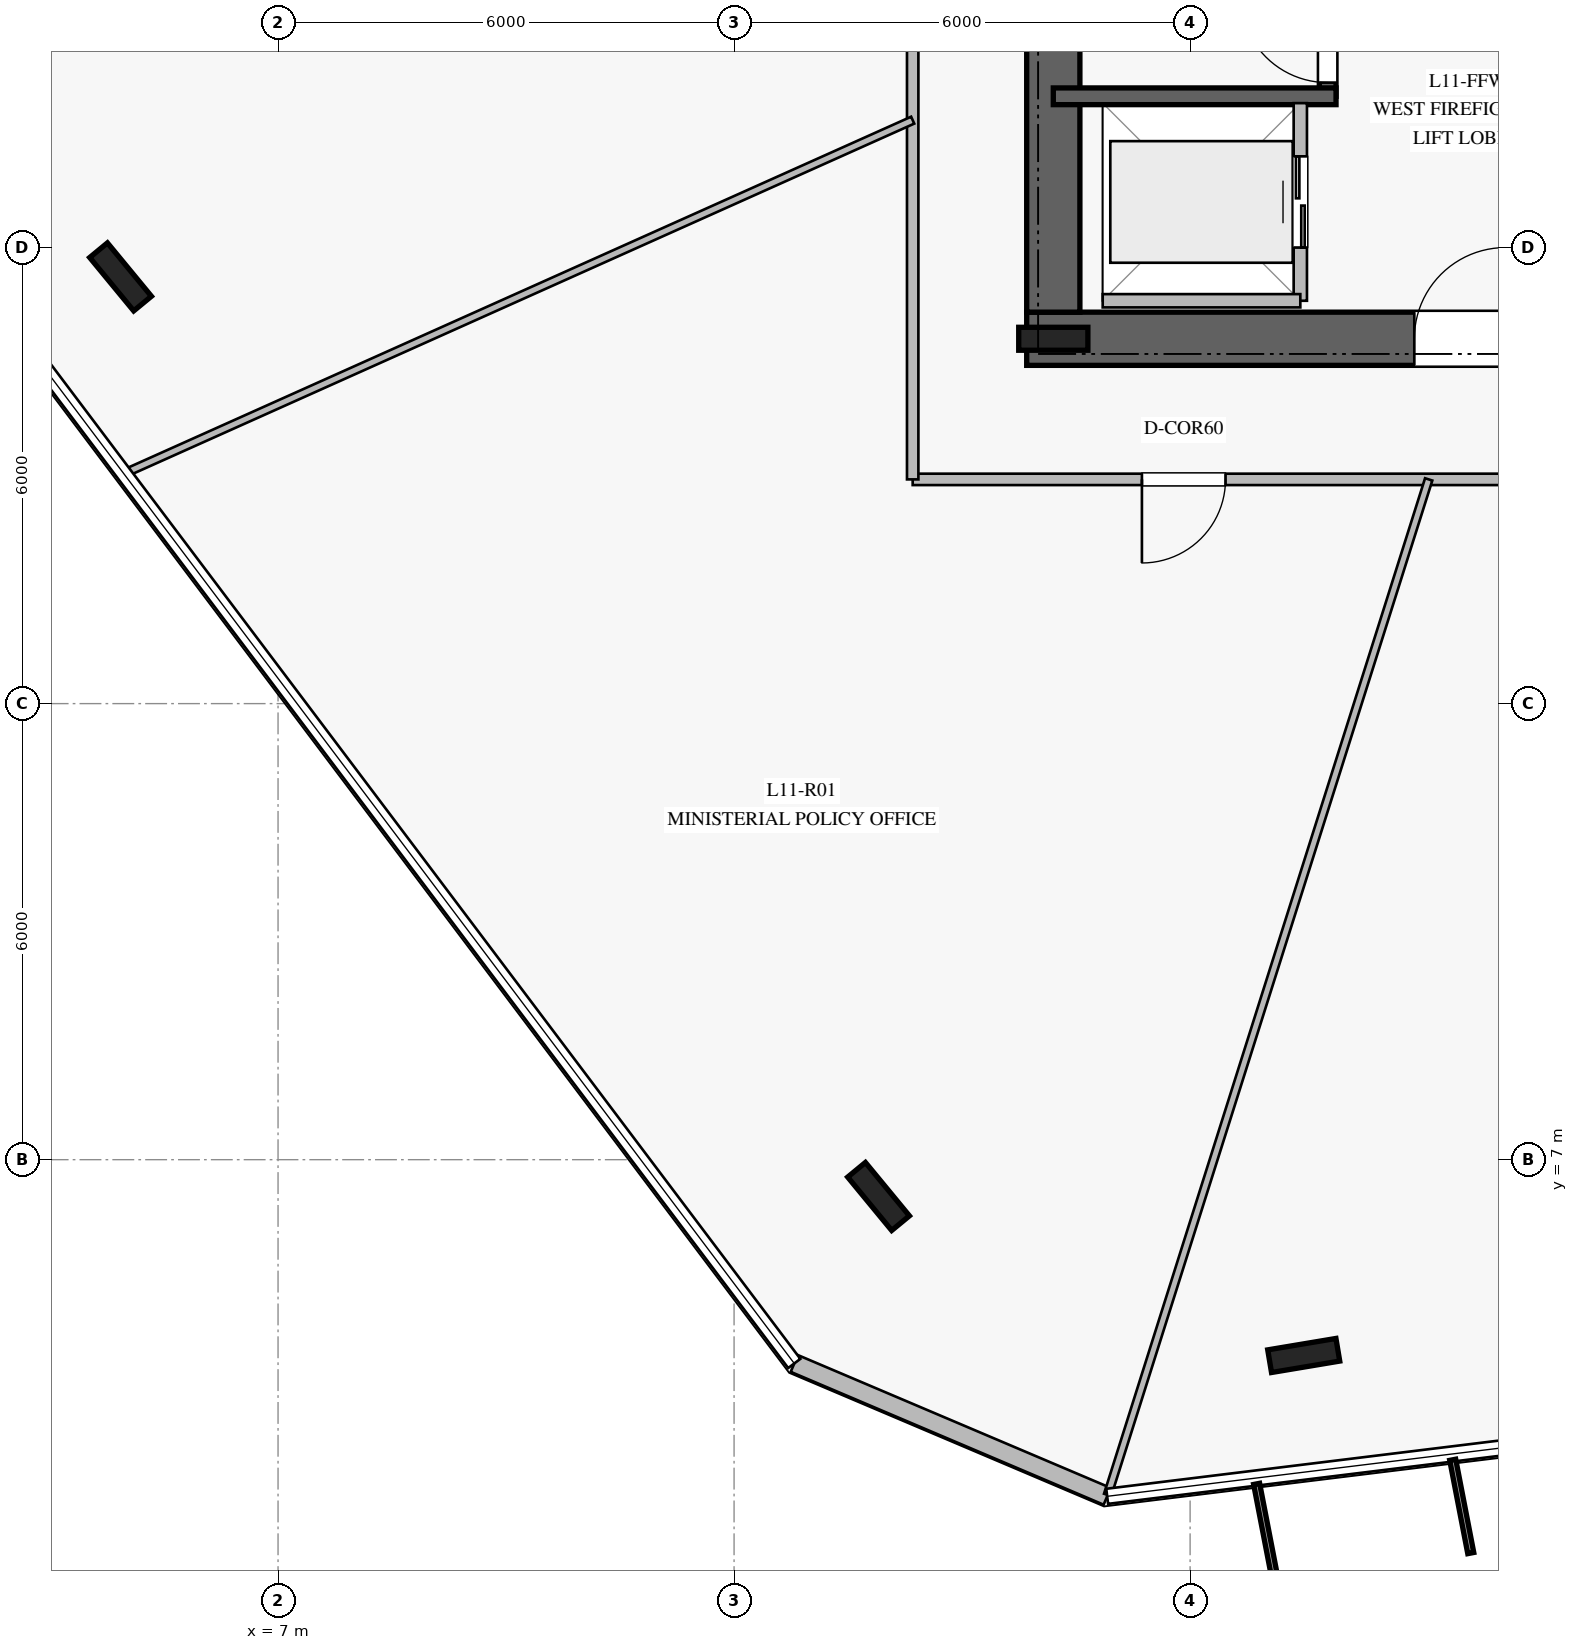
"""IFC4 building model, lengths in metres.
Left out: names, types, materials, properties, quantities, classifications, styles, units other than length and angle.
Written with IfcOpenShell. Run it as: python <this file> out.ifc"""

import sys

from ifc_helpers import new_model, si_unit, direction, frame, frame_2d, origin, origin_2d, place, context, subcontext, project, spatial, rectangle, i_section, extrude, element, fill, save


model = new_model("IFC4")
c1 = context("Model", 3, precision=1e-05, world=origin(), true_north=direction((0.0, 1.0)))
c2 = subcontext(c1, "Body", "Model", "MODEL_VIEW")
j1 = project(units=[si_unit("LENGTHUNIT", "METRE"), si_unit("PLANEANGLEUNIT", "RADIAN")], contexts=[c1])
p1 = place(None, origin())
s1 = spatial("IfcSite", under=j1, at=p1, CompositionType="ELEMENT")
p2 = place(p1, origin())
s2 = spatial("IfcBuilding", under=s1, at=p2, CompositionType="ELEMENT")
p3 = place(p2, frame((0.0, 0.0, 48.0)))
s3 = spatial("IfcBuildingStorey", under=s2, at=p3, CompositionType="ELEMENT", Elevation=48.0)
p4 = place(p3, frame((16.85, 17.8, 0.0), z_axis=(0.0, 0.0, 1.0), x_axis=(1.0, 0.0, 0.0)))
e1 = element("IfcWall", 1, at=p4, inside=s3, PredefinedType="SHEAR", context=c2, shape_type="SweptSolid", body=[
    extrude(rectangle(XDim=16.3, YDim=0.7, at=frame_2d((8.15, 0.0))), origin(), (0.0, 0.0, 1.0), 3.76),
])
p5 = place(p4, frame((5.1, 0.0, 0.0)))
e2 = element("IfcOpeningElement", 2, at=p5, cuts=e1, PredefinedType="OPENING", context=c2, shape_type="SweptSolid", body=[
    extrude(rectangle(XDim=1.2, YDim=2.25, at=frame_2d((0.6, 1.125))), frame((0.0, 0.36, 0.0), z_axis=(0.0, -1.0, 0.0), x_axis=(1.0, 0.0, 0.0)), (0.0, 0.0, 1.0), 0.72),
])
p6 = place(p4, frame((14.05, 0.0, 0.0)))
e3 = element("IfcOpeningElement", 3, at=p6, cuts=e1, PredefinedType="OPENING", context=c2, shape_type="SweptSolid", body=[
    extrude(rectangle(XDim=0.9, YDim=2.1, at=frame_2d((0.45, 1.05))), frame((0.0, 0.36, 0.0), z_axis=(0.0, -1.0, 0.0), x_axis=(1.0, 0.0, 0.0)), (0.0, 0.0, 1.0), 0.72),
])
p7 = place(p4, frame((7.95, 0.0, 0.0)))
e4 = element("IfcOpeningElement", 4, at=p7, cuts=e1, PredefinedType="OPENING", context=c2, shape_type="SweptSolid", body=[
    extrude(rectangle(XDim=1.1, YDim=2.2, at=frame_2d((0.55, 1.1))), frame((0.0, 0.36, 0.0), z_axis=(0.0, -1.0, 0.0), x_axis=(1.0, 0.0, 0.0)), (0.0, 0.0, 1.0), 0.72),
])
p8 = place(p4, frame((9.925, 0.0, 0.0)))
e5 = element("IfcOpeningElement", 5, at=p8, cuts=e1, PredefinedType="OPENING", context=c2, shape_type="SweptSolid", body=[
    extrude(rectangle(XDim=1.1, YDim=2.2, at=frame_2d((0.55, 1.1))), frame((0.0, 0.36, 0.0), z_axis=(0.0, -1.0, 0.0), x_axis=(1.0, 0.0, 0.0)), (0.0, 0.0, 1.0), 0.72),
])
p9 = place(p4, frame((11.9, 0.0, 0.0)))
e6 = element("IfcOpeningElement", 6, at=p9, cuts=e1, PredefinedType="OPENING", context=c2, shape_type="SweptSolid", body=[
    extrude(rectangle(XDim=1.1, YDim=2.2, at=frame_2d((0.55, 1.1))), frame((0.0, 0.36, 0.0), z_axis=(0.0, -1.0, 0.0), x_axis=(1.0, 0.0, 0.0)), (0.0, 0.0, 1.0), 0.72),
])
p10 = place(p3, frame((17.2, 31.85, 0.0), z_axis=(0.0, 0.0, 1.0), x_axis=(0.0, -1.0, 0.0)))
e7 = element("IfcWall", 7, at=p10, inside=s3, PredefinedType="SHEAR", context=c2, shape_type="SweptSolid", body=[
    extrude(rectangle(XDim=13.7, YDim=0.7, at=frame_2d((6.85, 0.0))), origin(), (0.0, 0.0, 1.0), 3.76),
])
p11 = place(p10, frame((2.0, 0.0, 0.0)))
e8 = element("IfcOpeningElement", 8, at=p11, cuts=e7, PredefinedType="OPENING", context=c2, shape_type="SweptSolid", body=[
    extrude(rectangle(XDim=1.5, YDim=2.2, at=frame_2d((0.75, 1.1))), frame((0.0, 0.36, 0.0), z_axis=(0.0, -1.0, 0.0), x_axis=(1.0, 0.0, 0.0)), (0.0, 0.0, 1.0), 0.72),
])
p12 = place(p3, frame((17.2, 17.8, 0.0), z_axis=(0.0, 0.0, 1.0), x_axis=(1.0, 0.0, 0.0)))
e9 = element("IfcColumn", 9, at=p12, inside=s3, PredefinedType="COLUMN", context=c2, shape_type="SweptSolid", body=[
    extrude(i_section(OverallWidth=0.302, OverallDepth=0.91, WebThickness=0.021, FlangeThickness=0.04, at=origin_2d()), origin(), (0.0, 0.0, 1.0), 4.0),
])
p13 = place(p3, frame((20.81, 20.99, 0.0), z_axis=(0.0, 0.0, 1.0), x_axis=(0.0, 1.0, 0.0)))
e10 = element("IfcWall", 10, at=p13, inside=s3, PredefinedType="SOLIDWALL", context=c2, shape_type="SweptSolid", body=[
    extrude(rectangle(XDim=7.22, YDim=0.22, at=frame_2d((3.61, 0.0))), origin(), (0.0, 0.0, 1.0), 3.76),
])
p14 = place(p13, frame((0.18, 0.0, 0.0)))
e11 = element("IfcOpeningElement", 11, at=p14, cuts=e10, PredefinedType="OPENING", context=c2, shape_type="SweptSolid", body=[
    extrude(rectangle(XDim=1.15, YDim=2.2, at=frame_2d((0.575, 1.1))), frame((0.0, 0.12, 0.0), z_axis=(0.0, -1.0, 0.0), x_axis=(1.0, 0.0, 0.0)), (0.0, 0.0, 1.0), 0.24),
])
p15 = place(p3, frame((17.2, 20.99, 0.0), z_axis=(0.0, 0.0, 1.0), x_axis=(1.0, 0.0, 0.0)))
e12 = element("IfcWall", 12, at=p15, inside=s3, PredefinedType="SOLIDWALL", context=c2, shape_type="SweptSolid", body=[
    extrude(rectangle(XDim=3.72, YDim=0.22, at=frame_2d((1.86, 0.0))), origin(), (0.0, 0.0, 1.0), 3.76),
])
for number, where, z_axis, x_axis in (
    (13, (4.928, 18.614, 0.0), (0.0, 0.0, 1.0), (-0.636, 0.772, 0.0)),
    (14, (14.901, 6.516, 0.0), (0.0, 0.0, 1.0), (-0.636, 0.772, 0.0)),
    (15, (20.495, 4.424, 0.0), (0.0, 0.0, 1.0), (0.986, 0.165, 0.0)),
):
    element("IfcColumn", number, at=place(p3, frame(where, z_axis=z_axis, x_axis=x_axis)), inside=s3, PredefinedType="COLUMN", context=c2, shape_type="SweptSolid", body=[
        extrude(i_section(OverallWidth=0.302, OverallDepth=0.91, WebThickness=0.021, FlangeThickness=0.04, at=origin_2d()), origin(), (0.0, 0.0, 1.0), 4.0),
    ])
p16 = place(p3, frame((13.792, 4.319, 0.0), z_axis=(0.0, 0.0, 1.0), x_axis=(0.920463989724, -0.390827383409, 0.0)))
e16 = element("IfcWall", 16, at=p16, inside=s3, PredefinedType="STANDARD", context=c2, shape_type="SweptSolid", body=[
    extrude(rectangle(XDim=4.473, YDim=0.24, at=frame_2d((2.236, 0.0))), origin(), (0.0, 0.0, 1.0), 3.76),
])
p17 = place(p3, frame((20.45, 18.3, 0.0), z_axis=(0.0, 0.0, 1.0), x_axis=(0.0, 1.0, 0.0)))
e17 = element("IfcWall", 17, at=p17, inside=s3, PredefinedType="PARTITIONING", context=c2, shape_type="SweptSolid", body=[
    extrude(rectangle(XDim=2.6, YDim=0.175, at=frame_2d((1.3, 0.0))), origin(), (0.0, 0.0, 1.0), 3.76),
])
p18 = place(p17, frame((0.7, 0.0, 0.0)))
e18 = element("IfcOpeningElement", 18, at=p18, cuts=e17, PredefinedType="OPENING", context=c2, shape_type="SweptSolid", body=[
    extrude(rectangle(XDim=1.2, YDim=2.2, at=frame_2d((0.6, 1.1))), frame((0.0, 0.098, 0.0), z_axis=(0.0, -1.0, 0.0), x_axis=(1.0, 0.0, 0.0)), (0.0, 0.0, 1.0), 0.195),
])
p19 = place(p3, frame((17.85, 18.3, 0.0), z_axis=(0.0, 0.0, 1.0), x_axis=(1.0, 0.0, 0.0)))
e19 = element("IfcWall", 19, at=p19, inside=s3, PredefinedType="PARTITIONING", context=c2, shape_type="SweptSolid", body=[
    extrude(rectangle(XDim=2.6, YDim=0.175, at=frame_2d((1.3, 0.0))), origin(), (0.0, 0.0, 1.0), 3.76),
])
p20 = place(p3, frame((34.65, 15.95, 0.0), z_axis=(0.0, 0.0, 1.0), x_axis=(-1.0, 0.0, 0.0)))
e20 = element("IfcWall", 20, at=p20, inside=s3, PredefinedType="PARTITIONING", context=c2, shape_type="SweptSolid", body=[
    extrude(rectangle(XDim=19.3, YDim=0.15, at=frame_2d((9.65, 0.0))), origin(), (0.0, 0.0, 1.0), 3.21),
])
p21 = place(p20, frame((15.184, 0.0, 0.0)))
e21 = element("IfcOpeningElement", 21, at=p21, cuts=e20, PredefinedType="OPENING", context=c2, shape_type="SweptSolid", body=[
    extrude(rectangle(XDim=1.1, YDim=2.2, at=frame_2d((0.55, 1.1))), frame((0.0, 0.085, 0.0), z_axis=(0.0, -1.0, 0.0), x_axis=(1.0, 0.0, 0.0)), (0.0, 0.0, 1.0), 0.17),
])
p22 = place(p20, frame((6.268, 0.0, 0.0)))
e22 = element("IfcOpeningElement", 22, at=p22, cuts=e20, PredefinedType="OPENING", context=c2, shape_type="SweptSolid", body=[
    extrude(rectangle(XDim=1.1, YDim=2.2, at=frame_2d((0.55, 1.1))), frame((0.0, 0.085, 0.0), z_axis=(0.0, -1.0, 0.0), x_axis=(1.0, 0.0, 0.0)), (0.0, 0.0, 1.0), 0.17),
])
p23 = place(p3, frame((15.35, 15.95, 0.0), z_axis=(0.0, 0.0, 1.0), x_axis=(0.0, 1.0, 0.0)))
e23 = element("IfcWall", 23, at=p23, inside=s3, PredefinedType="PARTITIONING", context=c2, shape_type="SweptSolid", body=[
    extrude(rectangle(XDim=18.1, YDim=0.15, at=frame_2d((9.05, 0.0))), origin(), (0.0, 0.0, 1.0), 3.21),
])
p24 = place(p23, frame((9.84, 0.0, 0.0)))
e24 = element("IfcOpeningElement", 24, at=p24, cuts=e23, PredefinedType="OPENING", context=c2, shape_type="SweptSolid", body=[
    extrude(rectangle(XDim=1.1, YDim=2.2, at=frame_2d((0.55, 1.1))), frame((0.0, 0.085, 0.0), z_axis=(0.0, -1.0, 0.0), x_axis=(1.0, 0.0, 0.0)), (0.0, 0.0, 1.0), 0.17),
])
p25 = place(p3, frame((15.35, 20.676, 0.0), z_axis=(0.0, 0.0, 1.0), x_axis=(-0.912557190222, -0.408949110005, 0.0)))
e25 = element("IfcWall", 25, at=p25, inside=s3, PredefinedType="MOVABLE", context=c2, shape_type="SweptSolid", body=[
    extrude(rectangle(XDim=11.356, YDim=0.1, at=frame_2d((5.678, 0.0))), origin(), (0.0, 0.0, 1.0), 3.06),
])
p26 = place(p3, frame((22.139, 15.95, 0.0), z_axis=(0.0, 0.0, 1.0), x_axis=(-0.301454069298, -0.953480699387, 0.0)))
e26 = element("IfcWall", 26, at=p26, inside=s3, PredefinedType="MOVABLE", context=c2, shape_type="SweptSolid", body=[
    extrude(rectangle(XDim=14.012, YDim=0.1, at=frame_2d((7.006, 0.0))), origin(), (0.0, 0.0, 1.0), 3.05),
])
p27 = place(p14, origin())
e27 = element("IfcDoor", 27, at=p27, inside=s3, OperationType="SINGLE_SWING_RIGHT", PredefinedType="DOOR", context=c2, shape_type="SweptSolid", body=[
    extrude(rectangle(XDim=1.15, YDim=2.2, at=frame_2d((0.575, 1.1))), frame((0.0, 0.025, 0.0), z_axis=(0.0, -1.0, 0.0), x_axis=(1.0, 0.0, 0.0)), (0.0, 0.0, 1.0), 0.05),
])
fill(e11, e27)
p28 = place(p5, origin())
e28 = element("IfcDoor", 28, at=p28, inside=s3, OperationType="SINGLE_SWING_RIGHT", PredefinedType="DOOR", context=c2, shape_type="SweptSolid", body=[
    extrude(rectangle(XDim=1.2, YDim=2.25, at=frame_2d((0.6, 1.125))), frame((0.0, 0.025, 0.0), z_axis=(0.0, -1.0, 0.0), x_axis=(1.0, 0.0, 0.0)), (0.0, 0.0, 1.0), 0.05),
])
fill(e2, e28)
p29 = place(p18, origin())
e29 = element("IfcDoor", 29, at=p29, inside=s3, OperationType="DOUBLE_DOOR_SLIDING", PredefinedType="DOOR", context=c2, shape_type="SweptSolid", body=[
    extrude(rectangle(XDim=1.2, YDim=2.2, at=frame_2d((0.6, 1.1))), frame((0.0, 0.025, 0.0), z_axis=(0.0, -1.0, 0.0), x_axis=(1.0, 0.0, 0.0)), (0.0, 0.0, 1.0), 0.05),
])
fill(e18, e29)
p30 = place(p21, origin())
e30 = element("IfcDoor", 30, at=p30, inside=s3, OperationType="SINGLE_SWING_RIGHT", PredefinedType="DOOR", context=c2, shape_type="SweptSolid", body=[
    extrude(rectangle(XDim=1.1, YDim=2.2, at=frame_2d((0.55, 1.1))), frame((0.0, 0.025, 0.0), z_axis=(0.0, -1.0, 0.0), x_axis=(1.0, 0.0, 0.0)), (0.0, 0.0, 1.0), 0.05),
])
fill(e21, e30)
save(model, sys.argv[1])
